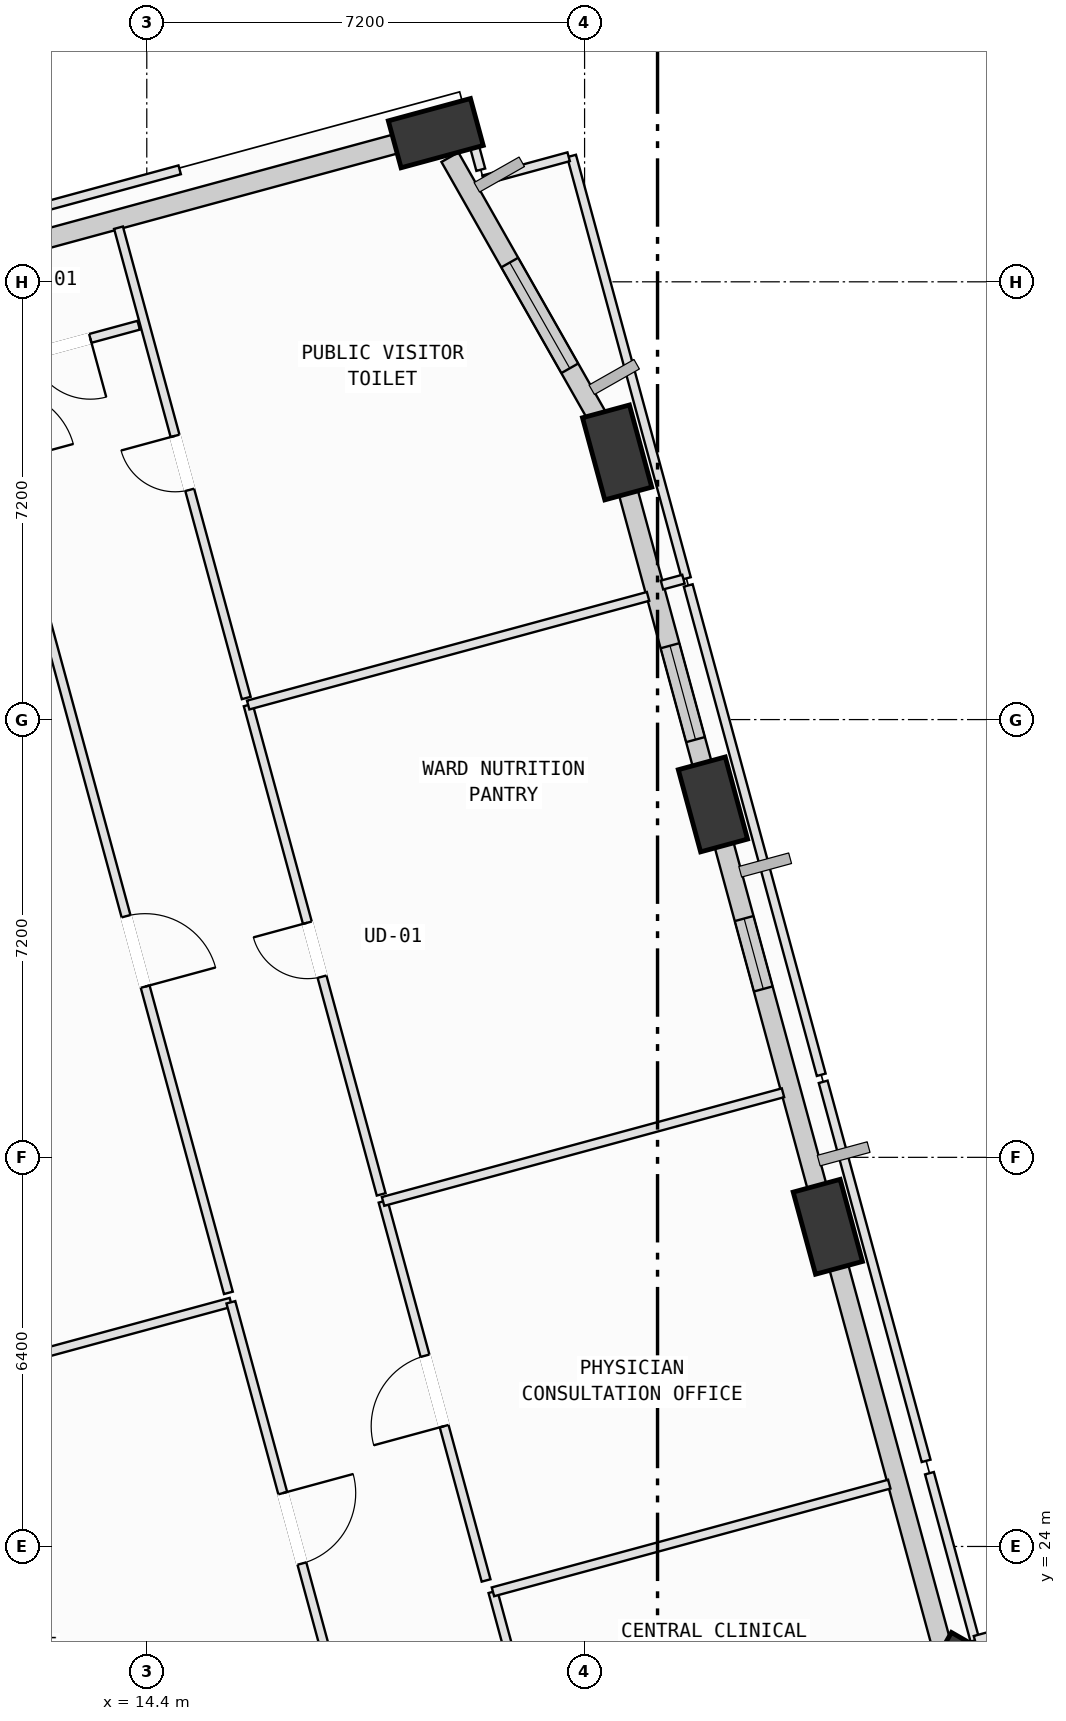
"""IFC4 building model, lengths in metres.
Left out: names, types, materials, properties, quantities, classifications, styles, units other than length and angle.
Written with IfcOpenShell. Run it as: python <this file> out.ifc"""

import sys

from ifc_helpers import new_model, si_unit, direction, frame, frame_2d, origin, origin_2d, place, context, subcontext, project, spatial, rectangle, extrude, element, fill, save


model = new_model("IFC4")
c1 = context("Model", 3, precision=1e-05, world=origin(), true_north=direction((0.0, 1.0)))
c2 = subcontext(c1, "Body", "Model", "MODEL_VIEW")
j1 = project(units=[si_unit("LENGTHUNIT", "METRE"), si_unit("PLANEANGLEUNIT", "RADIAN")], contexts=[c1])
p1 = place(None, origin())
s1 = spatial("IfcSite", under=j1, at=p1, CompositionType="ELEMENT")
p2 = place(p1, origin())
s2 = spatial("IfcBuilding", under=s1, at=p2, CompositionType="ELEMENT")
p3 = place(p2, frame((0.0, 0.0, 88.4)))
s3 = spatial("IfcBuildingStorey", under=s2, at=p3, CompositionType="ELEMENT", Elevation=88.4)
p4 = place(p3, frame((27.633, 21.779, 0.025), z_axis=(0.012775417682, -0.024629531204, 0.99961501334), x_axis=(0.041751933516, 0.998837867097, 0.024076779265)))
e1 = element("IfcColumn", 1, at=p4, inside=s3, PredefinedType="COLUMN", context=c2, shape_type="SweptSolid", body=[
    extrude(rectangle(XDim=1.4, YDim=0.8, at=origin_2d()), origin(), (0.0, 0.0, 1.0), 3.975),
])
p5 = place(p3, frame((25.601, 29.258, 0.032), z_axis=(-0.018207839126, -0.033340029752, 0.999278198006), x_axis=(0.232094427976, 0.972002209671, 0.036658981122)))
e2 = element("IfcColumn", 2, at=p5, inside=s3, PredefinedType="COLUMN", context=c2, shape_type="SweptSolid", body=[
    extrude(rectangle(XDim=1.4, YDim=0.8, at=origin_2d()), origin(), (0.0, 0.0, 1.0), 3.969),
])
p6 = place(p3, frame((23.711, 36.205, 0.051), z_axis=(-0.046855821749, -0.041299795455, 0.998047523349), x_axis=(0.549159183113, 0.833541377051, 0.060274076899)))
e3 = element("IfcColumn", 3, at=p6, inside=s3, PredefinedType="COLUMN", context=c2, shape_type="SweptSolid", body=[
    extrude(rectangle(XDim=1.4, YDim=0.8, at=origin_2d()), origin(), (0.0, 0.0, 1.0), 3.955),
])
p7 = place(p3, frame((22.135, 41.994, 0.069), z_axis=(-0.070575652412, -0.04791715348, 0.996354868352), x_axis=(0.648202629794, 0.757005030897, 0.082320920335)))
e4 = element("IfcColumn", 4, at=p7, inside=s3, PredefinedType="COLUMN", context=c2, shape_type="SweptSolid", body=[
    extrude(rectangle(XDim=1.4, YDim=0.8, at=origin_2d()), origin(), (0.0, 0.0, 1.0), 3.944),
])
p8 = place(p3, frame((19.153, 47.245, 0.065), z_axis=(-0.091989780155, -0.060277676198, 0.993933841913), x_axis=(0.746878057935, -0.664335519439, 0.028835467529)))
e5 = element("IfcColumn", 5, at=p8, inside=s3, PredefinedType="COLUMN", context=c2, shape_type="SweptSolid", body=[
    extrude(rectangle(XDim=1.4, YDim=0.8, at=origin_2d()), origin(), (0.0, 0.0, 1.0), 3.957),
])
p9 = place(p3, frame((28.12, 21.912, 0.0), z_axis=(0.0, 0.0, 1.0), x_axis=(0.965022370274, 0.26216755114, 0.0)))
e6 = element("IfcWall", 6, at=p9, inside=s3, PredefinedType="SOLIDWALL", context=c2, shape_type="SweptSolid", body=[
    extrude(rectangle(XDim=5.96, YDim=0.32, at=frame_2d((2.98, 0.0))), origin(), (0.0, 0.0, 1.0), 3.165),
])
p10 = place(p3, frame((25.745, 28.73, 0.0), z_axis=(0.0, 0.0, 1.0), x_axis=(0.262166868699, -0.965022555673, 0.0)))
e7 = element("IfcWall", 7, at=p10, inside=s3, PredefinedType="SOLIDWALL", context=c2, shape_type="SweptSolid", body=[
    extrude(rectangle(XDim=6.76, YDim=0.32, at=frame_2d((3.38, 0.0))), origin(), (0.0, 0.0, 1.0), 2.765),
])
p11 = place(p3, frame((23.854, 35.687, 0.0), z_axis=(0.0, 0.0, 1.0), x_axis=(0.262204330766, -0.965012377603, 0.0)))
e8 = element("IfcWall", 8, at=p11, inside=s3, PredefinedType="SOLIDWALL", context=c2, shape_type="SweptSolid", body=[
    extrude(rectangle(XDim=6.223, YDim=0.32, at=frame_2d((3.111, 0.0))), origin(), (0.0, 0.0, 1.0), 2.765),
])
p12 = place(p11, frame((1.409, 0.0, 0.75)))
e9 = element("IfcOpeningElement", 9, at=p12, cuts=e8, PredefinedType="OPENING", context=c2, shape_type="SweptSolid", body=[
    extrude(rectangle(XDim=1.2, YDim=1.75, at=frame_2d((0.6, 0.875))), frame((0.0, 0.17, 0.0), z_axis=(0.0, -1.0, 0.0), x_axis=(1.0, 0.0, 0.0)), (0.0, 0.0, 1.0), 0.34),
])
p13 = place(p3, frame((22.278, 41.491, 0.0), z_axis=(0.0, 0.0, 1.0), x_axis=(0.262175888255, -0.965020105292, 0.0)))
e10 = element("IfcWall", 10, at=p13, inside=s3, PredefinedType="SOLIDWALL", context=c2, shape_type="SweptSolid", body=[
    extrude(rectangle(XDim=5.047, YDim=0.32, at=frame_2d((2.523, 0.0))), origin(), (0.0, 0.0, 1.0), 3.165),
])
p14 = place(p13, frame((2.773, 0.0, 0.75)))
e11 = element("IfcOpeningElement", 11, at=p14, cuts=e10, PredefinedType="OPENING", context=c2, shape_type="SweptSolid", body=[
    extrude(rectangle(XDim=1.6, YDim=1.95, at=frame_2d((0.8, 0.975))), frame((0.0, 0.17, 0.0), z_axis=(0.0, -1.0, 0.0), x_axis=(1.0, 0.0, 0.0)), (0.0, 0.0, 1.0), 0.34),
])
p15 = place(p3, frame((19.385, 46.85, 0.0), z_axis=(0.0, 0.0, 1.0), x_axis=(0.49366585325, -0.869651668966, 0.0)))
e12 = element("IfcWall", 12, at=p15, inside=s3, PredefinedType="SOLIDWALL", context=c2, shape_type="SweptSolid", body=[
    extrude(rectangle(XDim=5.128, YDim=0.32, at=frame_2d((2.564, 0.0))), origin(), (0.0, 0.0, 1.0), 3.165),
])
p16 = place(p15, frame((1.993, 0.0, 0.75)))
e13 = element("IfcOpeningElement", 13, at=p16, cuts=e12, PredefinedType="OPENING", context=c2, shape_type="SweptSolid", body=[
    extrude(rectangle(XDim=2.0, YDim=1.95, at=frame_2d((1.0, 0.975))), frame((0.0, 0.17, 0.0), z_axis=(0.0, -1.0, 0.0), x_axis=(1.0, 0.0, 0.0)), (0.0, 0.0, 1.0), 0.34),
])
p17 = place(p3, frame((11.504, 45.169, 0.0), z_axis=(0.0, 0.0, 1.0), x_axis=(0.965021257098, 0.262171648638, 0.0)))
e14 = element("IfcWall", 14, at=p17, inside=s3, PredefinedType="SOLIDWALL", context=c2, shape_type="SweptSolid", body=[
    extrude(rectangle(XDim=7.231, YDim=0.32, at=frame_2d((3.615, 0.0))), origin(), (0.0, 0.0, 1.0), 3.165),
])
p18 = place(p3, frame((5.202, 25.142, 0.0), z_axis=(0.0, 0.0, 1.0), x_axis=(0.965034618354, 0.262122462558, 0.0)))
e15 = element("IfcWall", 15, at=p18, inside=s3, PredefinedType="PARTITIONING", context=c2, shape_type="SweptSolid", body=[
    extrude(rectangle(XDim=10.964, YDim=0.15, at=frame_2d((5.482, 0.0))), origin(), (0.0, 0.0, 1.0), 3.78),
])
p19 = place(p3, frame((15.783, 28.016, 0.0), z_axis=(0.0, 0.0, 1.0), x_axis=(0.26227015523, -0.964994489972, 0.0)))
e16 = element("IfcWall", 16, at=p19, inside=s3, PredefinedType="PARTITIONING", context=c2, shape_type="SweptSolid", body=[
    extrude(rectangle(XDim=7.706, YDim=0.15, at=frame_2d((3.853, 0.0))), origin(), (0.0, 0.0, 1.0), 3.78),
])
p20 = place(p19, frame((3.253, 0.0, 0.0)))
e17 = element("IfcOpeningElement", 17, at=p20, cuts=e16, PredefinedType="OPENING", context=c2, shape_type="SweptSolid", body=[
    extrude(rectangle(XDim=1.2, YDim=2.15, at=frame_2d((0.6, 1.075))), frame((0.0, 0.085, 0.0), z_axis=(0.0, -1.0, 0.0), x_axis=(1.0, 0.0, 0.0)), (0.0, 0.0, 1.0), 0.17),
])
p21 = place(p3, frame((12.69, 39.403, 0.0), z_axis=(0.0, 0.0, 1.0), x_axis=(0.262212125461, -0.965010259666, 0.0)))
e18 = element("IfcWall", 18, at=p21, inside=s3, PredefinedType="PARTITIONING", context=c2, shape_type="SweptSolid", body=[
    extrude(rectangle(XDim=11.639, YDim=0.15, at=frame_2d((5.82, 0.0))), origin(), (0.0, 0.0, 1.0), 3.78),
])
p22 = place(p21, frame((5.219, 0.0, 0.0)))
e19 = element("IfcOpeningElement", 19, at=p22, cuts=e18, PredefinedType="OPENING", context=c2, shape_type="SweptSolid", body=[
    extrude(rectangle(XDim=1.2, YDim=2.15, at=frame_2d((0.6, 1.075))), frame((0.0, 0.085, 0.0), z_axis=(0.0, -1.0, 0.0), x_axis=(1.0, 0.0, 0.0)), (0.0, 0.0, 1.0), 0.17),
])
p23 = place(p3, frame((20.819, 20.58, 0.0), z_axis=(0.0, 0.0, 1.0), x_axis=(-0.262058493621, 0.965051991305, 0.0)))
e20 = element("IfcWall", 20, at=p23, inside=s3, PredefinedType="PARTITIONING", context=c2, shape_type="SweptSolid", body=[
    extrude(rectangle(XDim=2.771, YDim=0.15, at=frame_2d((1.385, 0.0))), origin(), (0.0, 0.0, 1.0), 3.78),
])
p24 = place(p3, frame((20.093, 23.254, 0.0), z_axis=(0.0, 0.0, 1.0), x_axis=(0.965013623276, 0.26219974617, 0.0)))
e21 = element("IfcWall", 21, at=p24, inside=s3, PredefinedType="PARTITIONING", context=c2, shape_type="SweptSolid", body=[
    extrude(rectangle(XDim=6.754, YDim=0.15, at=frame_2d((3.377, 0.0))), origin(), (0.0, 0.0, 1.0), 3.78),
])
p25 = place(p3, frame((27.272, 25.205, 0.0), z_axis=(0.0, 0.0, 1.0), x_axis=(0.262479468872, -0.964937577474, 0.0)))
e22 = element("IfcWall", 22, at=p25, inside=s3, PredefinedType="PARTITIONING", context=c2, shape_type="SweptSolid", body=[
    extrude(rectangle(XDim=2.85, YDim=0.15, at=frame_2d((1.425, 0.0))), origin(), (0.0, 0.0, 1.0), 3.78),
])
p26 = place(p3, frame((28.02, 22.455, 0.0), z_axis=(0.0, 0.0, 1.0), x_axis=(0.965015238814, 0.262193800188, 0.0)))
e23 = element("IfcWall", 23, at=p26, inside=s3, PredefinedType="PARTITIONING", context=c2, shape_type="SweptSolid", body=[
    extrude(rectangle(XDim=8.456, YDim=0.15, at=frame_2d((4.228, 0.0))), origin(), (0.0, 0.0, 1.0), 3.78),
])
p27 = place(p3, frame((19.98, 23.441, 0.0), z_axis=(0.0, 0.0, 1.0), x_axis=(-0.262234720493, 0.965004119871, 0.0)))
e24 = element("IfcWall", 24, at=p27, inside=s3, PredefinedType="PARTITIONING", context=c2, shape_type="SweptSolid", body=[
    extrude(rectangle(XDim=6.46, YDim=0.15, at=frame_2d((3.23, 0.0))), origin(), (0.0, 0.0, 1.0), 3.78),
])
p28 = place(p27, frame((2.63, 0.0, 0.0)))
e25 = element("IfcOpeningElement", 25, at=p28, cuts=e24, PredefinedType="OPENING", context=c2, shape_type="SweptSolid", body=[
    extrude(rectangle(XDim=1.2, YDim=2.15, at=frame_2d((0.6, 1.075))), frame((0.0, 0.085, 0.0), z_axis=(0.0, -1.0, 0.0), x_axis=(1.0, 0.0, 0.0)), (0.0, 0.0, 1.0), 0.17),
])
p29 = place(p3, frame((18.286, 29.675, 0.0), z_axis=(0.0, 0.0, 1.0), x_axis=(0.965020446002, 0.262174634161, 0.0)))
e26 = element("IfcWall", 26, at=p29, inside=s3, PredefinedType="PARTITIONING", context=c2, shape_type="SweptSolid", body=[
    extrude(rectangle(XDim=6.816, YDim=0.15, at=frame_2d((3.408, 0.0))), origin(), (0.0, 0.0, 1.0), 3.78),
])
p30 = place(p3, frame((25.524, 31.642, 0.0), z_axis=(0.0, 0.0, 1.0), x_axis=(0.262093941631, -0.965042364749, 0.0)))
e27 = element("IfcWall", 27, at=p30, inside=s3, PredefinedType="PARTITIONING", context=c2, shape_type="SweptSolid", body=[
    extrude(rectangle(XDim=6.46, YDim=0.15, at=frame_2d((3.23, 0.0))), origin(), (0.0, 0.0, 1.0), 3.78),
])
p31 = place(p3, frame((18.255, 29.791, 0.0), z_axis=(0.0, 0.0, 1.0), x_axis=(-0.262205746142, 0.965011993029, 0.0)))
e28 = element("IfcWall", 28, at=p31, inside=s3, PredefinedType="PARTITIONING", context=c2, shape_type="SweptSolid", body=[
    extrude(rectangle(XDim=8.34, YDim=0.15, at=frame_2d((4.17, 0.0))), origin(), (0.0, 0.0, 1.0), 3.78),
])
p32 = place(p31, frame((3.71, 0.0, 0.0)))
e29 = element("IfcOpeningElement", 29, at=p32, cuts=e28, PredefinedType="OPENING", context=c2, shape_type="SweptSolid", body=[
    extrude(rectangle(XDim=0.92, YDim=2.1, at=frame_2d((0.46, 1.05))), frame((0.0, 0.085, 0.0), z_axis=(0.0, -1.0, 0.0), x_axis=(1.0, 0.0, 0.0)), (0.0, 0.0, 1.0), 0.17),
])
p33 = place(p3, frame((16.068, 37.839, 0.0), z_axis=(0.0, 0.0, 1.0), x_axis=(0.965008131897, 0.262219956093, 0.0)))
e30 = element("IfcWall", 30, at=p33, inside=s3, PredefinedType="PARTITIONING", context=c2, shape_type="SweptSolid", body=[
    extrude(rectangle(XDim=6.814, YDim=0.15, at=frame_2d((3.407, 0.0))), origin(), (0.0, 0.0, 1.0), 3.78),
])
p34 = place(p3, frame((23.305, 39.806, 0.0), z_axis=(0.0, 0.0, 1.0), x_axis=(0.262240415099, -0.965002572374, 0.0)))
e31 = element("IfcWall", 31, at=p34, inside=s3, PredefinedType="PARTITIONING", context=c2, shape_type="SweptSolid", body=[
    extrude(rectangle(XDim=8.34, YDim=0.15, at=frame_2d((4.17, 0.0))), origin(), (0.0, 0.0, 1.0), 3.78),
])
p35 = place(p3, frame((21.386, 46.87, 0.0), z_axis=(0.0, 0.0, 1.0), x_axis=(0.26221636167, -0.965009108596, 0.0)))
e32 = element("IfcWall", 32, at=p35, inside=s3, PredefinedType="PARTITIONING", context=c2, shape_type="SweptSolid", body=[
    extrude(rectangle(XDim=7.2, YDim=0.15, at=frame_2d((3.6, 0.0))), origin(), (0.0, 0.0, 1.0), 3.78),
])
p36 = place(p3, frame((23.226, 39.909, 0.0), z_axis=(0.0, 0.0, 1.0), x_axis=(-0.9649944567, -0.262270277651, 0.0)))
e33 = element("IfcWall", 33, at=p36, inside=s3, PredefinedType="PARTITIONING", context=c2, shape_type="SweptSolid", body=[
    extrude(rectangle(XDim=0.366, YDim=0.15, at=frame_2d((0.183, 0.0))), origin(), (0.0, 0.0, 1.0), 3.78),
])
p37 = place(p3, frame((16.036, 37.955, 0.0), z_axis=(0.0, 0.0, 1.0), x_axis=(-0.262109500246, 0.965038139081, 0.0)))
e34 = element("IfcWall", 34, at=p37, inside=s3, PredefinedType="PARTITIONING", context=c2, shape_type="SweptSolid", body=[
    extrude(rectangle(XDim=8.015, YDim=0.15, at=frame_2d((4.008, 0.0))), origin(), (0.0, 0.0, 1.0), 3.78),
])
p38 = place(p37, frame((3.548, 0.0, 0.0)))
e35 = element("IfcOpeningElement", 35, at=p38, cuts=e34, PredefinedType="OPENING", context=c2, shape_type="SweptSolid", body=[
    extrude(rectangle(XDim=0.92, YDim=2.1, at=frame_2d((0.46, 1.05))), frame((0.0, 0.085, 0.0), z_axis=(0.0, -1.0, 0.0), x_axis=(1.0, 0.0, 0.0)), (0.0, 0.0, 1.0), 0.17),
])
p39 = place(p3, frame((18.432, 47.249, 0.0), z_axis=(0.0, 0.0, 1.0), x_axis=(0.965082683379, 0.261945441346, 0.0)))
e36 = element("IfcWall", 36, at=p39, inside=s3, PredefinedType="PARTITIONING", context=c2, shape_type="SweptSolid", body=[
    extrude(rectangle(XDim=1.252, YDim=0.15, at=frame_2d((0.626, 0.0))), origin(), (0.0, 0.0, 1.0), 3.165),
])
p40 = place(p3, frame((19.653, 47.529, 0.0), z_axis=(0.0, 0.0, 1.0), x_axis=(0.261720359667, -0.965143747499, 0.0)))
e37 = element("IfcWall", 37, at=p40, inside=s3, PredefinedType="PARTITIONING", context=c2, shape_type="SweptSolid", body=[
    extrude(rectangle(XDim=0.917, YDim=0.15, at=frame_2d((0.458, 0.0))), origin(), (0.0, 0.0, 1.0), 3.78),
])
p41 = place(p3, frame((19.939, 46.476, 0.0), z_axis=(0.0, 0.0, 1.0), x_axis=(0.964880304912, 0.262689925945, 0.0)))
e38 = element("IfcWall", 38, at=p41, inside=s3, PredefinedType="PARTITIONING", context=c2, shape_type="SweptSolid", body=[
    extrude(rectangle(XDim=1.45, YDim=0.15, at=frame_2d((0.725, 0.0))), origin(), (0.0, 0.0, 1.0), 3.78),
])
p42 = place(p3, frame((14.267, 44.086, 0.0), z_axis=(0.0, 0.0, 1.0), x_axis=(-0.965010032649, -0.262212960943, 0.0)))
e39 = element("IfcWall", 39, at=p42, inside=s3, PredefinedType="PARTITIONING", context=c2, shape_type="SweptSolid", body=[
    extrude(rectangle(XDim=2.65, YDim=0.15, at=frame_2d((1.325, 0.0))), origin(), (0.0, 0.0, 1.0), 3.78),
])
p43 = place(p42, frame((0.825, 0.0, 0.0)))
e40 = element("IfcOpeningElement", 40, at=p43, cuts=e39, PredefinedType="OPENING", context=c2, shape_type="SweptSolid", body=[
    extrude(rectangle(XDim=1.0, YDim=2.12, at=frame_2d((0.5, 1.06))), frame((0.0, 0.085, 0.0), z_axis=(0.0, -1.0, 0.0), x_axis=(1.0, 0.0, 0.0)), (0.0, 0.0, 1.0), 0.17),
])
p44 = place(p3, frame((8.533, 44.901, 0.0), z_axis=(0.0, 0.0, 1.0), x_axis=(0.965008606139, 0.262218210804, 0.0)))
e41 = element("IfcWall", 41, at=p44, inside=s3, PredefinedType="PARTITIONING", context=c2, shape_type="SweptSolid", body=[
    extrude(rectangle(XDim=6.64, YDim=0.15, at=frame_2d((3.32, 0.0))), origin(), (0.0, 0.0, 1.0), 3.78),
])
p45 = place(p12, origin())
e42 = element("IfcWindow", 42, at=p45, inside=s3, PartitioningType="SINGLE_PANEL", PredefinedType="WINDOW", context=c2, shape_type="SweptSolid", body=[
    extrude(rectangle(XDim=1.2, YDim=1.75, at=frame_2d((0.6, 0.875))), frame((0.0, 0.03, 0.0), z_axis=(0.0, -1.0, 0.0), x_axis=(1.0, 0.0, 0.0)), (0.0, 0.0, 1.0), 0.06),
])
fill(e9, e42)
p46 = place(p14, origin())
e43 = element("IfcWindow", 43, at=p46, inside=s3, PartitioningType="SINGLE_PANEL", PredefinedType="WINDOW", context=c2, shape_type="SweptSolid", body=[
    extrude(rectangle(XDim=1.6, YDim=1.95, at=frame_2d((0.8, 0.975))), frame((0.0, 0.03, 0.0), z_axis=(0.0, -1.0, 0.0), x_axis=(1.0, 0.0, 0.0)), (0.0, 0.0, 1.0), 0.06),
])
fill(e11, e43)
p47 = place(p16, origin())
e44 = element("IfcWindow", 44, at=p47, inside=s3, PartitioningType="SINGLE_PANEL", PredefinedType="WINDOW", context=c2, shape_type="SweptSolid", body=[
    extrude(rectangle(XDim=2.0, YDim=1.95, at=frame_2d((1.0, 0.975))), frame((0.0, 0.03, 0.0), z_axis=(0.0, -1.0, 0.0), x_axis=(1.0, 0.0, 0.0)), (0.0, 0.0, 1.0), 0.06),
])
fill(e13, e44)
p48 = place(p20, origin())
e45 = element("IfcDoor", 45, at=p48, inside=s3, OperationType="SINGLE_SWING_LEFT", PredefinedType="DOOR", context=c2, shape_type="SweptSolid", body=[
    extrude(rectangle(XDim=1.2, YDim=2.15, at=frame_2d((0.6, 1.075))), frame((0.0, 0.025, 0.0), z_axis=(0.0, -1.0, 0.0), x_axis=(1.0, 0.0, 0.0)), (0.0, 0.0, 1.0), 0.05),
])
fill(e17, e45)
p49 = place(p22, origin())
e46 = element("IfcDoor", 46, at=p49, inside=s3, OperationType="SINGLE_SWING_RIGHT", PredefinedType="DOOR", context=c2, shape_type="SweptSolid", body=[
    extrude(rectangle(XDim=1.2, YDim=2.15, at=frame_2d((0.6, 1.075))), frame((0.0, 0.025, 0.0), z_axis=(0.0, -1.0, 0.0), x_axis=(1.0, 0.0, 0.0)), (0.0, 0.0, 1.0), 0.05),
])
fill(e19, e46)
p50 = place(p28, origin())
e47 = element("IfcDoor", 47, at=p50, inside=s3, OperationType="SINGLE_SWING_LEFT", PredefinedType="DOOR", context=c2, shape_type="SweptSolid", body=[
    extrude(rectangle(XDim=1.2, YDim=2.15, at=frame_2d((0.6, 1.075))), frame((0.0, 0.025, 0.0), z_axis=(0.0, -1.0, 0.0), x_axis=(1.0, 0.0, 0.0)), (0.0, 0.0, 1.0), 0.05),
])
fill(e25, e47)
p51 = place(p32, origin())
e48 = element("IfcDoor", 48, at=p51, inside=s3, OperationType="SINGLE_SWING_RIGHT", PredefinedType="DOOR", context=c2, shape_type="SweptSolid", body=[
    extrude(rectangle(XDim=0.92, YDim=2.1, at=frame_2d((0.46, 1.05))), frame((0.0, 0.025, 0.0), z_axis=(0.0, -1.0, 0.0), x_axis=(1.0, 0.0, 0.0)), (0.0, 0.0, 1.0), 0.05),
])
fill(e29, e48)
p52 = place(p38, origin())
e49 = element("IfcDoor", 49, at=p52, inside=s3, OperationType="SINGLE_SWING_RIGHT", PredefinedType="DOOR", context=c2, shape_type="SweptSolid", body=[
    extrude(rectangle(XDim=0.92, YDim=2.1, at=frame_2d((0.46, 1.05))), frame((0.0, 0.025, 0.0), z_axis=(0.0, -1.0, 0.0), x_axis=(1.0, 0.0, 0.0)), (0.0, 0.0, 1.0), 0.05),
])
fill(e35, e49)
p53 = place(p43, origin())
e50 = element("IfcDoor", 50, at=p53, inside=s3, OperationType="SINGLE_SWING_LEFT", PredefinedType="DOOR", context=c2, shape_type="SweptSolid", body=[
    extrude(rectangle(XDim=1.0, YDim=2.12, at=frame_2d((0.5, 1.06))), frame((0.0, 0.025, 0.0), z_axis=(0.0, -1.0, 0.0), x_axis=(1.0, 0.0, 0.0)), (0.0, 0.0, 1.0), 0.05),
])
fill(e40, e50)
save(model, sys.argv[1])
